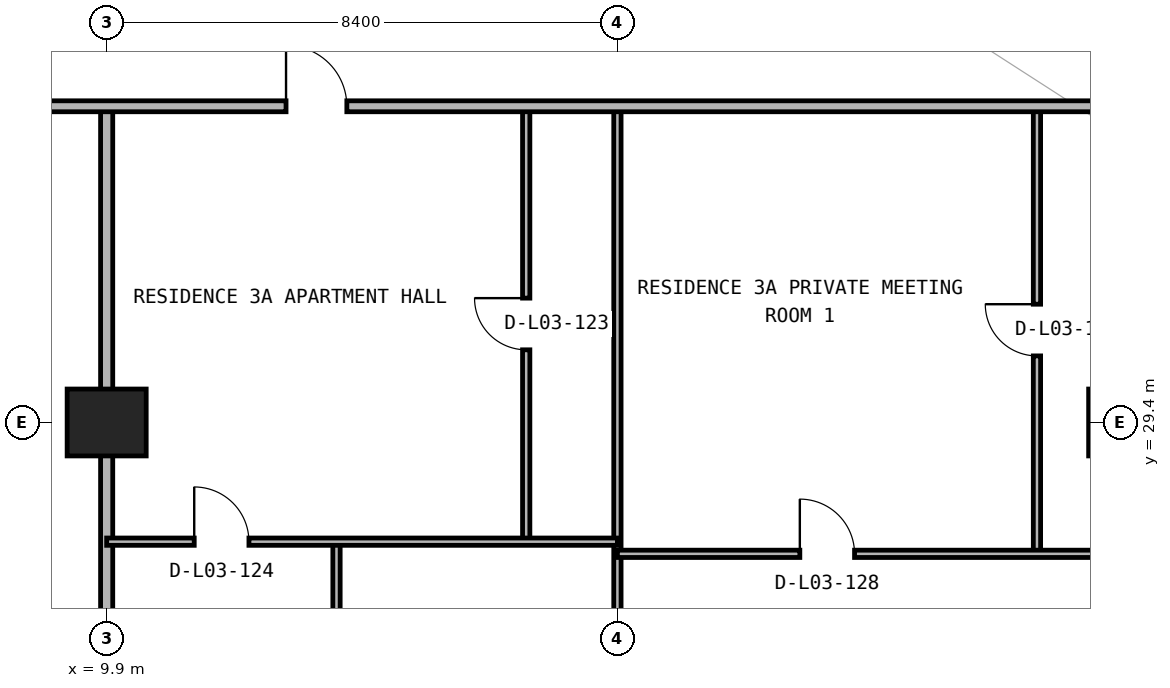
"""IFC4 building model, lengths in metres.
Left out: names, types, materials, properties, quantities, classifications, styles, units other than length and angle.
Written with IfcOpenShell. Run it as: python <this file> out.ifc"""

import sys

from ifc_helpers import new_model, si_unit, direction, frame, frame_2d, origin, origin_2d, place, context, subcontext, project, spatial, rectangle, extrude, element, fill, save


model = new_model("IFC4")
c1 = context("Model", 3, precision=1e-05, world=origin(), true_north=direction((0.0, 1.0)))
c2 = subcontext(c1, "Body", "Model", "MODEL_VIEW")
j1 = project(units=[si_unit("LENGTHUNIT", "METRE"), si_unit("PLANEANGLEUNIT", "RADIAN")], contexts=[c1])
p1 = place(None, origin())
s1 = spatial("IfcSite", under=j1, at=p1, CompositionType="ELEMENT")
p2 = place(p1, origin())
s2 = spatial("IfcBuilding", under=s1, at=p2, CompositionType="ELEMENT")
p3 = place(p2, frame((0.0, 0.0, 15.0)))
s3 = spatial("IfcBuildingStorey", under=s2, at=p3, CompositionType="ELEMENT", Elevation=15.0)
for number, where, z_axis, x_axis in (
    (1, (9.9, 29.4, 0.0), (0.0, 0.0, 1.0), (1.0, 0.0, 0.0)),
    (2, (26.7, 29.4, 0.0), (0.0, 0.0, 1.0), (1.0, 0.0, 0.0)),
):
    element("IfcColumn", number, at=place(p3, frame(where, z_axis=z_axis, x_axis=x_axis)), inside=s3, PredefinedType="COLUMN", context=c2, shape_type="SweptSolid", body=[
        extrude(rectangle(XDim=1.3, YDim=1.1, at=origin_2d()), origin(), (0.0, 0.0, 1.0), 4.5),
    ])
p4 = place(p3, frame((9.9, 2.095, 0.0), z_axis=(0.0, 0.0, 1.0), x_axis=(0.0, 1.0, 0.0)))
e3 = element("IfcWall", 3, at=p4, inside=s3, PredefinedType="PARTITIONING", context=c2, shape_type="SweptSolid", body=[
    extrude(rectangle(XDim=32.505, YDim=0.2, at=frame_2d((16.252, 0.0))), origin(), (0.0, 0.0, 1.0), 3.464),
])
p5 = place(p3, frame((13.68, 22.64, 0.0), z_axis=(0.0, 0.0, 1.0), x_axis=(0.0, 1.0, 0.0)))
e4 = element("IfcWall", 4, at=p5, inside=s3, PredefinedType="PARTITIONING", context=c2, shape_type="SweptSolid", body=[
    extrude(rectangle(XDim=4.8, YDim=0.12, at=frame_2d((2.4, 0.0))), origin(), (0.0, 0.0, 1.0), 4.5),
])
p6 = place(p5, frame((1.95, 0.0, 0.0)))
e5 = element("IfcOpeningElement", 5, at=p6, cuts=e4, PredefinedType="OPENING", context=c2, shape_type="SweptSolid", body=[
    extrude(rectangle(XDim=0.9, YDim=2.15, at=frame_2d((0.45, 1.075))), frame((0.0, 0.07, 0.0), z_axis=(0.0, -1.0, 0.0), x_axis=(1.0, 0.0, 0.0)), (0.0, 0.0, 1.0), 0.14),
])
p7 = place(p3, frame((16.8, 27.44, 0.0), z_axis=(0.0, 0.0, 1.0), x_axis=(0.0, 1.0, 0.0)))
e6 = element("IfcWall", 6, at=p7, inside=s3, PredefinedType="PARTITIONING", context=c2, shape_type="SweptSolid", body=[
    extrude(rectangle(XDim=7.16, YDim=0.12, at=frame_2d((3.58, 0.0))), origin(), (0.0, 0.0, 1.0), 3.873),
])
p8 = place(p7, frame((3.155, 0.0, 0.0)))
e7 = element("IfcOpeningElement", 7, at=p8, cuts=e6, PredefinedType="OPENING", context=c2, shape_type="SweptSolid", body=[
    extrude(rectangle(XDim=0.85, YDim=2.1, at=frame_2d((0.425, 1.05))), frame((0.0, 0.07, 0.0), z_axis=(0.0, -1.0, 0.0), x_axis=(1.0, 0.0, 0.0)), (0.0, 0.0, 1.0), 0.14),
])
p9 = place(p3, frame((18.3, 2.095, 0.0), z_axis=(0.0, 0.0, 1.0), x_axis=(0.0, 1.0, 0.0)))
e8 = element("IfcWall", 8, at=p9, inside=s3, PredefinedType="PARTITIONING", context=c2, shape_type="SweptSolid", body=[
    extrude(rectangle(XDim=32.505, YDim=0.12, at=frame_2d((16.252, 0.0))), origin(), (0.0, 0.0, 1.0), 4.5),
])
p10 = place(p9, frame((22.495, 0.0, 0.0)))
e9 = element("IfcOpeningElement", 9, at=p10, cuts=e8, PredefinedType="OPENING", context=c2, shape_type="SweptSolid", body=[
    extrude(rectangle(XDim=0.9, YDim=2.15, at=frame_2d((0.45, 1.075))), frame((0.0, 0.07, 0.0), z_axis=(0.0, -1.0, 0.0), x_axis=(1.0, 0.0, 0.0)), (0.0, 0.0, 1.0), 0.14),
])
p11 = place(p3, frame((25.2, 27.24, 0.0), z_axis=(0.0, 0.0, 1.0), x_axis=(0.0, 1.0, 0.0)))
e10 = element("IfcWall", 10, at=p11, inside=s3, PredefinedType="PARTITIONING", context=c2, shape_type="SweptSolid", body=[
    extrude(rectangle(XDim=7.36, YDim=0.12, at=frame_2d((3.68, 0.0))), origin(), (0.0, 0.0, 1.0), 4.5),
])
p12 = place(p11, frame((3.255, 0.0, 0.0)))
e11 = element("IfcOpeningElement", 11, at=p12, cuts=e10, PredefinedType="OPENING", context=c2, shape_type="SweptSolid", body=[
    extrude(rectangle(XDim=0.85, YDim=2.1, at=frame_2d((0.425, 1.05))), frame((0.0, 0.07, 0.0), z_axis=(0.0, -1.0, 0.0), x_axis=(1.0, 0.0, 0.0)), (0.0, 0.0, 1.0), 0.14),
])
p13 = place(p3, frame((18.3, 27.24, 0.0), z_axis=(0.0, 0.0, 1.0), x_axis=(1.0, 0.0, 0.0)))
e12 = element("IfcWall", 12, at=p13, inside=s3, PredefinedType="PARTITIONING", context=c2, shape_type="SweptSolid", body=[
    extrude(rectangle(XDim=8.4, YDim=0.12, at=frame_2d((4.2, 0.0))), origin(), (0.0, 0.0, 1.0), 4.5),
])
p14 = place(p13, frame((3.0, 0.0, 0.0)))
e13 = element("IfcOpeningElement", 13, at=p14, cuts=e12, PredefinedType="OPENING", context=c2, shape_type="SweptSolid", body=[
    extrude(rectangle(XDim=0.9, YDim=2.15, at=frame_2d((0.45, 1.075))), frame((0.0, 0.07, 0.0), z_axis=(0.0, -1.0, 0.0), x_axis=(1.0, 0.0, 0.0)), (0.0, 0.0, 1.0), 0.14),
])
p15 = place(p3, frame((9.9, 27.44, 0.0), z_axis=(0.0, 0.0, 1.0), x_axis=(1.0, 0.0, 0.0)))
e14 = element("IfcWall", 14, at=p15, inside=s3, PredefinedType="PARTITIONING", context=c2, shape_type="SweptSolid", body=[
    extrude(rectangle(XDim=8.4, YDim=0.12, at=frame_2d((4.2, 0.0))), origin(), (0.0, 0.0, 1.0), 4.5),
])
p16 = place(p15, frame((1.44, 0.0, 0.0)))
e15 = element("IfcOpeningElement", 15, at=p16, cuts=e14, PredefinedType="OPENING", context=c2, shape_type="SweptSolid", body=[
    extrude(rectangle(XDim=0.9, YDim=2.15, at=frame_2d((0.45, 1.075))), frame((0.0, 0.07, 0.0), z_axis=(0.0, -1.0, 0.0), x_axis=(1.0, 0.0, 0.0)), (0.0, 0.0, 1.0), 0.14),
])
p17 = place(p3, frame((1.295, 34.6, 0.0), z_axis=(0.0, 0.0, 1.0), x_axis=(1.0, 0.0, 0.0)))
e16 = element("IfcWall", 16, at=p17, inside=s3, PredefinedType="PARTITIONING", context=c2, shape_type="SweptSolid", body=[
    extrude(rectangle(XDim=75.21, YDim=0.18, at=frame_2d((37.605, 0.0))), origin(), (0.0, 0.0, 1.0), 4.5),
])
p18 = place(p17, frame((3.778, 0.0, 0.0)))
e17 = element("IfcOpeningElement", 17, at=p18, cuts=e16, PredefinedType="OPENING", context=c2, shape_type="SweptSolid", body=[
    extrude(rectangle(XDim=1.05, YDim=2.15, at=frame_2d((0.525, 1.075))), frame((0.0, 0.1, 0.0), z_axis=(0.0, -1.0, 0.0), x_axis=(1.0, 0.0, 0.0)), (0.0, 0.0, 1.0), 0.2),
])
p19 = place(p17, frame((11.555, 0.0, 0.0)))
e18 = element("IfcOpeningElement", 18, at=p19, cuts=e16, PredefinedType="OPENING", context=c2, shape_type="SweptSolid", body=[
    extrude(rectangle(XDim=1.0, YDim=2.2, at=frame_2d((0.5, 1.1))), frame((0.0, 0.1, 0.0), z_axis=(0.0, -1.0, 0.0), x_axis=(1.0, 0.0, 0.0)), (0.0, 0.0, 1.0), 0.2),
])
p20 = place(p17, frame((28.263, 0.0, 0.0)))
e19 = element("IfcOpeningElement", 19, at=p20, cuts=e16, PredefinedType="OPENING", context=c2, shape_type="SweptSolid", body=[
    extrude(rectangle(XDim=1.0, YDim=2.2, at=frame_2d((0.5, 1.1))), frame((0.0, 0.1, 0.0), z_axis=(0.0, -1.0, 0.0), x_axis=(1.0, 0.0, 0.0)), (0.0, 0.0, 1.0), 0.2),
])
p21 = place(p17, frame((61.982, 0.0, 0.0)))
e20 = element("IfcOpeningElement", 20, at=p21, cuts=e16, PredefinedType="OPENING", context=c2, shape_type="SweptSolid", body=[
    extrude(rectangle(XDim=1.05, YDim=2.15, at=frame_2d((0.525, 1.075))), frame((0.0, 0.1, 0.0), z_axis=(0.0, -1.0, 0.0), x_axis=(1.0, 0.0, 0.0)), (0.0, 0.0, 1.0), 0.2),
])
p22 = place(p19, origin())
e21 = element("IfcDoor", 21, at=p22, inside=s3, OperationType="SINGLE_SWING_LEFT", PredefinedType="DOOR", context=c2, shape_type="SweptSolid", body=[
    extrude(rectangle(XDim=1.0, YDim=2.2, at=frame_2d((0.5, 1.1))), frame((0.0, 0.025, 0.0), z_axis=(0.0, -1.0, 0.0), x_axis=(1.0, 0.0, 0.0)), (0.0, 0.0, 1.0), 0.05),
])
fill(e18, e21)
p23 = place(p8, origin())
e22 = element("IfcDoor", 22, at=p23, inside=s3, OperationType="SINGLE_SWING_RIGHT", PredefinedType="DOOR", context=c2, shape_type="SweptSolid", body=[
    extrude(rectangle(XDim=0.85, YDim=2.1, at=frame_2d((0.425, 1.05))), frame((0.0, 0.025, 0.0), z_axis=(0.0, -1.0, 0.0), x_axis=(1.0, 0.0, 0.0)), (0.0, 0.0, 1.0), 0.05),
])
fill(e7, e22)
p24 = place(p16, origin())
e23 = element("IfcDoor", 23, at=p24, inside=s3, OperationType="SINGLE_SWING_LEFT", PredefinedType="DOOR", context=c2, shape_type="SweptSolid", body=[
    extrude(rectangle(XDim=0.9, YDim=2.15, at=frame_2d((0.45, 1.075))), frame((0.0, 0.025, 0.0), z_axis=(0.0, -1.0, 0.0), x_axis=(1.0, 0.0, 0.0)), (0.0, 0.0, 1.0), 0.05),
])
fill(e15, e23)
p25 = place(p14, origin())
e24 = element("IfcDoor", 24, at=p25, inside=s3, OperationType="SINGLE_SWING_LEFT", PredefinedType="DOOR", context=c2, shape_type="SweptSolid", body=[
    extrude(rectangle(XDim=0.9, YDim=2.15, at=frame_2d((0.45, 1.075))), frame((0.0, 0.025, 0.0), z_axis=(0.0, -1.0, 0.0), x_axis=(1.0, 0.0, 0.0)), (0.0, 0.0, 1.0), 0.05),
])
fill(e13, e24)
p26 = place(p12, origin())
e25 = element("IfcDoor", 25, at=p26, inside=s3, OperationType="SINGLE_SWING_RIGHT", PredefinedType="DOOR", context=c2, shape_type="SweptSolid", body=[
    extrude(rectangle(XDim=0.85, YDim=2.1, at=frame_2d((0.425, 1.05))), frame((0.0, 0.025, 0.0), z_axis=(0.0, -1.0, 0.0), x_axis=(1.0, 0.0, 0.0)), (0.0, 0.0, 1.0), 0.05),
])
fill(e11, e25)
save(model, sys.argv[1])
